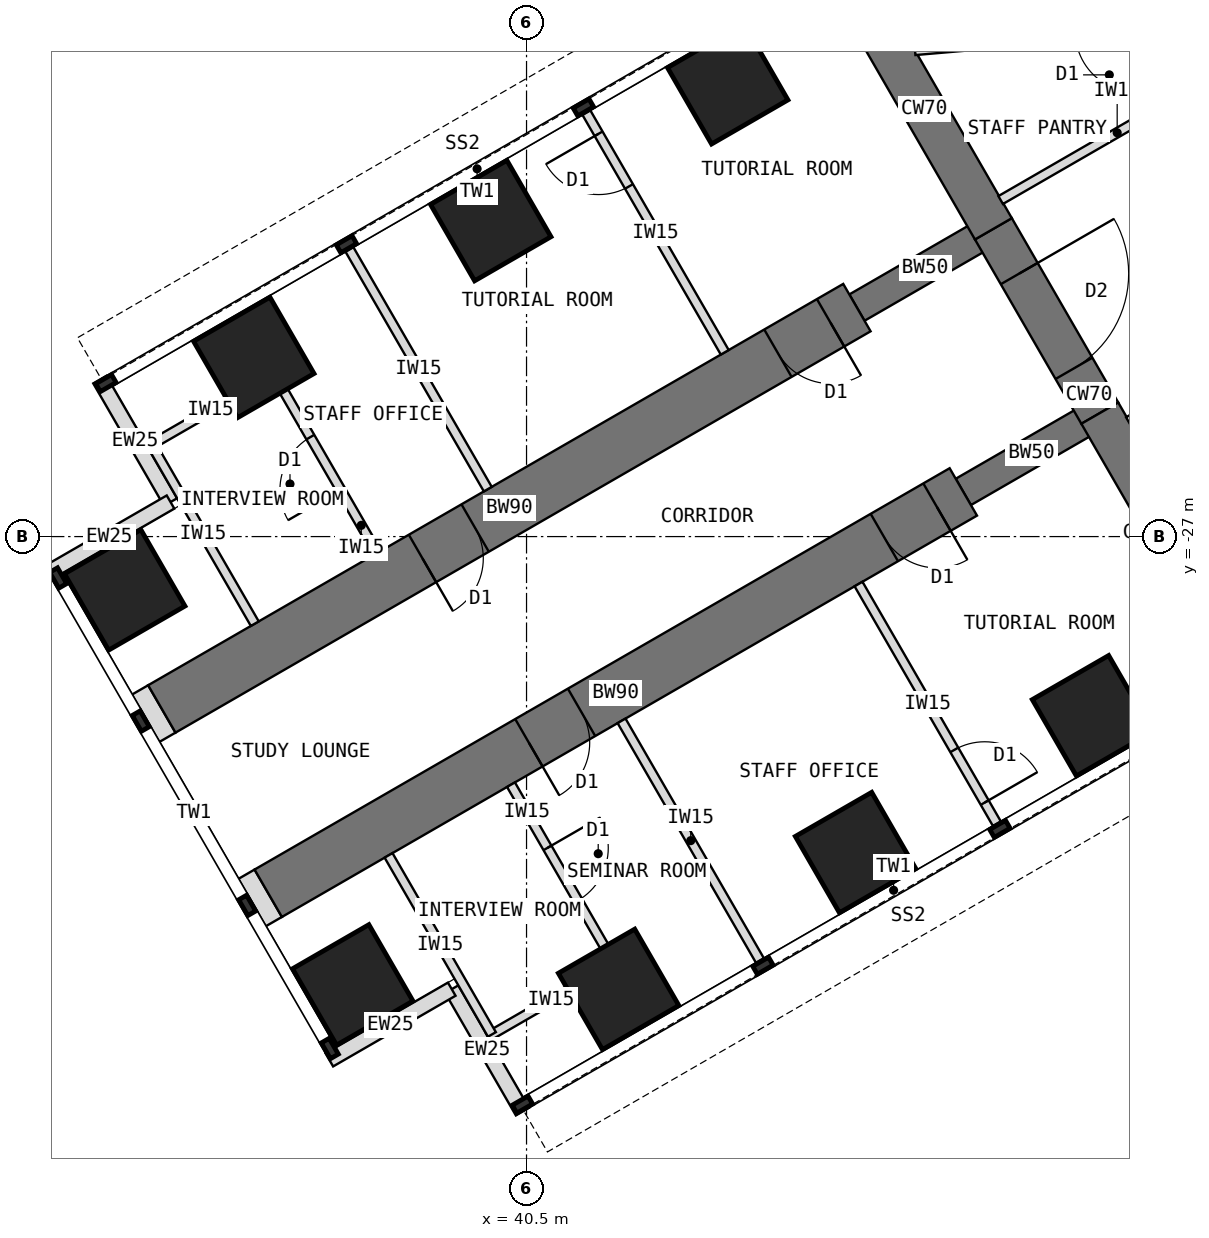
"""IFC4 building model, lengths in metres.
Left out: names, types, materials, properties, quantities, classifications, styles, units other than length and angle.
Written with IfcOpenShell. Run it as: python <this file> out.ifc"""

import sys

from ifc_helpers import new_model, si_unit, direction, frame, frame_2d, origin, origin_2d, place, context, subcontext, project, spatial, rectangle, extrude, element, fill, save


model = new_model("IFC4")
c1 = context("Model", 3, precision=1e-05, world=origin(), true_north=direction((0.0, 1.0)))
c2 = subcontext(c1, "Body", "Model", "MODEL_VIEW")
j1 = project(units=[si_unit("LENGTHUNIT", "METRE"), si_unit("PLANEANGLEUNIT", "RADIAN")], contexts=[c1])
p1 = place(None, origin())
s1 = spatial("IfcSite", under=j1, at=p1, CompositionType="ELEMENT")
p2 = place(p1, origin())
s2 = spatial("IfcBuilding", under=s1, at=p2, CompositionType="ELEMENT")
p3 = place(p2, frame((0.0, 0.0, 64.5)))
s3 = spatial("IfcBuildingStorey", under=s2, at=p3, CompositionType="ELEMENT", Elevation=64.5)
p4 = place(p3, frame((45.904, -18.0, 0.0), z_axis=(0.0, 0.0, 1.0), x_axis=(0.500024481964, -0.866011268655, 0.0)))
e1 = element("IfcWall", 1, at=p4, inside=s3, PredefinedType="SHEAR", context=c2, shape_type="SweptSolid", body=[
    extrude(rectangle(XDim=4.548, YDim=0.7, at=frame_2d((2.274, 0.0))), origin(), (0.0, 0.0, 1.0), 4.0),
])
p5 = place(p3, frame((48.178, -21.939, 0.0), z_axis=(0.0, 0.0, 1.0), x_axis=(0.500010275428, -0.866019471182, 0.0)))
e2 = element("IfcWall", 2, at=p5, inside=s3, PredefinedType="SHEAR", context=c2, shape_type="SweptSolid", body=[
    extrude(rectangle(XDim=3.5, YDim=0.7, at=frame_2d((1.75, 0.0))), origin(), (0.0, 0.0, 1.0), 4.0),
])
p6 = place(p5, frame((0.85, 0.0, 0.0)))
e3 = element("IfcOpeningElement", 3, at=p6, cuts=e2, PredefinedType="OPENING", context=c2, shape_type="SweptSolid", body=[
    extrude(rectangle(XDim=1.8, YDim=2.1, at=frame_2d((0.9, 1.05))), frame((0.0, 0.36, 0.0), z_axis=(0.0, -1.0, 0.0), x_axis=(1.0, 0.0, 0.0)), (0.0, 0.0, 1.0), 0.72),
])
p7 = place(p3, frame((49.928, -24.97, 0.0), z_axis=(0.0, 0.0, 1.0), x_axis=(0.499984222037, -0.866034513004, 0.0)))
e4 = element("IfcWall", 4, at=p7, inside=s3, PredefinedType="SHEAR", context=c2, shape_type="SweptSolid", body=[
    extrude(rectangle(XDim=4.548, YDim=0.7, at=frame_2d((2.274, 0.0))), origin(), (0.0, 0.0, 1.0), 4.0),
])
p8 = place(p3, frame((49.928, -24.97, 0.0), z_axis=(0.0, 0.0, 1.0), x_axis=(-0.866031863473, -0.499988811324, 0.0)))
e5 = element("IfcWall", 5, at=p8, inside=s3, PredefinedType="SHEAR", context=c2, shape_type="SweptSolid", body=[
    extrude(rectangle(XDim=2.592, YDim=0.5, at=frame_2d((1.296, 0.0))), origin(), (0.0, 0.0, 1.0), 4.0),
])
p9 = place(p3, frame((47.684, -26.266, 0.0), z_axis=(0.0, 0.0, 1.0), x_axis=(-0.866027579429, -0.499996231654, 0.0)))
e6 = element("IfcWall", 6, at=p9, inside=s3, PredefinedType="SHEAR", context=c2, shape_type="SweptSolid", body=[
    extrude(rectangle(XDim=13.2, YDim=0.9, at=frame_2d((6.6, 0.0))), origin(), (0.0, 0.0, 1.0), 4.0),
])
p10 = place(p9, frame((0.5, 0.0, 0.0)))
e7 = element("IfcOpeningElement", 7, at=p10, cuts=e6, PredefinedType="OPENING", context=c2, shape_type="SweptSolid", body=[
    extrude(rectangle(XDim=1.0, YDim=2.1, at=frame_2d((0.5, 1.05))), frame((0.0, 0.46, 0.0), z_axis=(0.0, -1.0, 0.0), x_axis=(1.0, 0.0, 0.0)), (0.0, 0.0, 1.0), 0.92),
])
p11 = place(p9, frame((7.25, 0.0, 0.0)))
e8 = element("IfcOpeningElement", 8, at=p11, cuts=e6, PredefinedType="OPENING", context=c2, shape_type="SweptSolid", body=[
    extrude(rectangle(XDim=1.0, YDim=2.1, at=frame_2d((0.5, 1.05))), frame((0.0, 0.46, 0.0), z_axis=(0.0, -1.0, 0.0), x_axis=(1.0, 0.0, 0.0)), (0.0, 0.0, 1.0), 0.92),
])
p12 = place(p3, frame((48.178, -21.939, 0.0), z_axis=(0.0, 0.0, 1.0), x_axis=(-0.866072649678, -0.499918158782, 0.0)))
e9 = element("IfcWall", 9, at=p12, inside=s3, PredefinedType="SHEAR", context=c2, shape_type="SweptSolid", body=[
    extrude(rectangle(XDim=2.592, YDim=0.5, at=frame_2d((1.296, 0.0))), origin(), (0.0, 0.0, 1.0), 4.0),
])
p13 = place(p3, frame((45.934, -23.234, 0.0), z_axis=(0.0, 0.0, 1.0), x_axis=(-0.866019570528, -0.500010103361, 0.0)))
e10 = element("IfcWall", 10, at=p13, inside=s3, PredefinedType="SHEAR", context=c2, shape_type="SweptSolid", body=[
    extrude(rectangle(XDim=13.2, YDim=0.9, at=frame_2d((6.6, 0.0))), origin(), (0.0, 0.0, 1.0), 4.0),
])
p14 = place(p13, frame((0.5, 0.0, 0.0)))
e11 = element("IfcOpeningElement", 11, at=p14, cuts=e10, PredefinedType="OPENING", context=c2, shape_type="SweptSolid", body=[
    extrude(rectangle(XDim=1.0, YDim=2.1, at=frame_2d((0.5, 1.05))), frame((0.0, 0.46, 0.0), z_axis=(0.0, -1.0, 0.0), x_axis=(1.0, 0.0, 0.0)), (0.0, 0.0, 1.0), 0.92),
])
p15 = place(p13, frame((7.25, 0.0, 0.0)))
e12 = element("IfcOpeningElement", 12, at=p15, cuts=e10, PredefinedType="OPENING", context=c2, shape_type="SweptSolid", body=[
    extrude(rectangle(XDim=1.0, YDim=2.1, at=frame_2d((0.5, 1.05))), frame((0.0, 0.46, 0.0), z_axis=(0.0, -1.0, 0.0), x_axis=(1.0, 0.0, 0.0)), (0.0, 0.0, 1.0), 0.92),
])
for number, where, z_axis, x_axis in (
    (13, (49.809, -29.946, 0.0), (0.0, 0.0, 1.0), (0.866, 0.5, 0.0)),
    (14, (43.809, -19.554, 0.0), (0.0, 0.0, 1.0), (0.866, 0.5, 0.0)),
    (15, (45.912, -32.196, 0.0), (0.0, 0.0, 1.0), (0.866, 0.5, 0.0)),
    (16, (39.912, -21.804, 0.0), (0.0, 0.0, 1.0), (0.866, 0.5, 0.0)),
    (17, (42.014, -34.446, 0.0), (0.0, 0.0, 1.0), (0.866, 0.5, 0.0)),
    (18, (36.014, -24.054, 0.0), (0.0, 0.0, 1.0), (0.866, 0.5, 0.0)),
    (19, (37.642, -34.373, 0.0), (0.0, 0.0, 1.0), (0.866, 0.5, 0.0)),
    (20, (33.892, -27.877, 0.0), (0.0, 0.0, 1.0), (0.866, 0.5, 0.0)),
):
    element("IfcColumn", number, at=place(p3, frame(where, z_axis=z_axis, x_axis=x_axis)), inside=s3, PredefinedType="COLUMN", context=c2, shape_type="SweptSolid", body=[
        extrude(rectangle(XDim=1.45, YDim=1.45, at=origin_2d()), origin(), (0.0, 0.0, 1.0), 4.0),
    ])
for number, where, z_axis, x_axis in (
    (21, (40.433, -36.456, 0.0), (0.0, 0.0, 1.0), (-0.5, 0.866, 0.0)),
    (22, (39.27, -34.443, 0.0), (0.0, 0.0, 1.0), (-0.866, -0.5, 0.0)),
    (23, (33.483, -24.419, 0.0), (0.0, 0.0, 1.0), (0.5, -0.866, 0.0)),
    (24, (34.645, -26.432, 0.0), (0.0, 0.0, 1.0), (-0.866, -0.5, 0.0)),
):
    element("IfcWall", number, at=place(p3, frame(where, z_axis=z_axis, x_axis=x_axis)), inside=s3, PredefinedType="STANDARD", context=c2, shape_type="SweptSolid", body=[
        extrude(rectangle(XDim=2.325, YDim=0.25, at=frame_2d((1.163, 0.0))), origin(), (0.0, 0.0, 1.0), 3.8),
    ])
for number, where, z_axis, x_axis in (
    (25, (36.252, -32.865, 0.0), (0.0, 0.0, 1.0), (-0.866, -0.5, 0.0)),
    (26, (34.502, -29.834, 0.0), (0.0, 0.0, 1.0), (-0.866, -0.5, 0.0)),
):
    element("IfcWall", number, at=place(p3, frame(where, z_axis=z_axis, x_axis=x_axis)), inside=s3, PredefinedType="PARTITIONING", context=c2, shape_type="SweptSolid", body=[
        extrude(rectangle(XDim=0.31, YDim=0.9, at=frame_2d((0.155, 0.0))), origin(), (0.0, 0.0, 1.0), 3.8),
    ])
p16 = place(p3, frame((52.38, -19.201, 0.0), z_axis=(0.0, 0.0, 1.0), x_axis=(-0.866023886965, 0.500002627198, 0.0)))
e27 = element("IfcWall", 27, at=p16, inside=s3, PredefinedType="SHEAR", context=c2, shape_type="SweptSolid", body=[
    extrude(rectangle(XDim=5.858, YDim=0.4, at=frame_2d((2.929, 0.0))), origin(), (0.0, 0.0, 1.0), 4.0),
])
p17 = place(p3, frame((45.96, -27.78, 0.0), z_axis=(0.0, 0.0, 1.0), x_axis=(0.499982560684, -0.866035472144, 0.0)))
e28 = element("IfcWall", 28, at=p17, inside=s3, PredefinedType="PARTITIONING", context=c2, shape_type="SweptSolid", body=[
    extrude(rectangle(XDim=4.55, YDim=0.15, at=frame_2d((2.275, 0.0))), origin(), (0.0, 0.0, 1.0), 3.8),
])
p18 = place(p17, frame((3.15, 0.0, 0.0)))
e29 = element("IfcOpeningElement", 29, at=p18, cuts=e28, PredefinedType="OPENING", context=c2, shape_type="SweptSolid", body=[
    extrude(rectangle(XDim=1.0, YDim=2.1, at=frame_2d((0.5, 1.05))), frame((0.0, 0.085, 0.0), z_axis=(0.0, -1.0, 0.0), x_axis=(1.0, 0.0, 0.0)), (0.0, 0.0, 1.0), 0.17),
])
p19 = place(p3, frame((42.063, -30.03, 0.0), z_axis=(0.0, 0.0, 1.0), x_axis=(0.499982560684, -0.866035472144, 0.0)))
e30 = element("IfcWall", 30, at=p19, inside=s3, PredefinedType="PARTITIONING", context=c2, shape_type="SweptSolid", body=[
    extrude(rectangle(XDim=4.55, YDim=0.15, at=frame_2d((2.275, 0.0))), origin(), (0.0, 0.0, 1.0), 3.8),
])
p20 = place(p3, frame((41.944, -34.025, 0.0), z_axis=(0.0, 0.0, 1.0), x_axis=(-0.865980596518, -0.500077600433, 0.0)))
e31 = element("IfcWall", 31, at=p20, inside=s3, PredefinedType="PARTITIONING", context=c2, shape_type="SweptSolid", body=[
    extrude(rectangle(XDim=2.4, YDim=0.15, at=frame_2d((1.2, 0.0))), origin(), (0.0, 0.0, 1.0), 3.8),
])
p21 = place(p3, frame((40.244, -31.08, 0.0), z_axis=(0.0, 0.0, 1.0), x_axis=(0.500008388397, -0.866020560687, 0.0)))
e32 = element("IfcWall", 32, at=p21, inside=s3, PredefinedType="PARTITIONING", context=c2, shape_type="SweptSolid", body=[
    extrude(rectangle(XDim=3.4, YDim=0.15, at=frame_2d((1.7, 0.0))), origin(), (0.0, 0.0, 1.0), 3.8),
])
p22 = place(p21, frame((1.2, 0.0, 0.0)))
e33 = element("IfcOpeningElement", 33, at=p22, cuts=e32, PredefinedType="OPENING", context=c2, shape_type="SweptSolid", body=[
    extrude(rectangle(XDim=1.0, YDim=2.1, at=frame_2d((0.5, 1.05))), frame((0.0, 0.085, 0.0), z_axis=(0.0, -1.0, 0.0), x_axis=(1.0, 0.0, 0.0)), (0.0, 0.0, 1.0), 0.17),
])
p23 = place(p3, frame((38.231, -32.243, 0.0), z_axis=(0.0, 0.0, 1.0), x_axis=(0.500031147688, -0.866007419912, 0.0)))
e34 = element("IfcWall", 34, at=p23, inside=s3, PredefinedType="PARTITIONING", context=c2, shape_type="SweptSolid", body=[
    extrude(rectangle(XDim=3.4, YDim=0.15, at=frame_2d((1.7, 0.0))), origin(), (0.0, 0.0, 1.0), 3.8),
])
p24 = place(p3, frame((43.76, -23.97, 0.0), z_axis=(0.0, 0.0, 1.0), x_axis=(-0.499982560684, 0.866035472144, 0.0)))
e35 = element("IfcWall", 35, at=p24, inside=s3, PredefinedType="PARTITIONING", context=c2, shape_type="SweptSolid", body=[
    extrude(rectangle(XDim=4.55, YDim=0.15, at=frame_2d((2.275, 0.0))), origin(), (0.0, 0.0, 1.0), 3.8),
])
p25 = place(p24, frame((3.15, 0.0, 0.0)))
e36 = element("IfcOpeningElement", 36, at=p25, cuts=e35, PredefinedType="OPENING", context=c2, shape_type="SweptSolid", body=[
    extrude(rectangle(XDim=1.0, YDim=2.1, at=frame_2d((0.5, 1.05))), frame((0.0, 0.085, 0.0), z_axis=(0.0, -1.0, 0.0), x_axis=(1.0, 0.0, 0.0)), (0.0, 0.0, 1.0), 0.17),
])
p26 = place(p3, frame((39.863, -26.22, 0.0), z_axis=(0.0, 0.0, 1.0), x_axis=(-0.500022803284, 0.866012237902, 0.0)))
e37 = element("IfcWall", 37, at=p26, inside=s3, PredefinedType="PARTITIONING", context=c2, shape_type="SweptSolid", body=[
    extrude(rectangle(XDim=4.55, YDim=0.15, at=frame_2d((2.275, 0.0))), origin(), (0.0, 0.0, 1.0), 3.8),
])
p27 = place(p3, frame((36.344, -24.325, 0.0), z_axis=(0.0, 0.0, 1.0), x_axis=(-0.866024647952, -0.500001309137, 0.0)))
e38 = element("IfcWall", 38, at=p27, inside=s3, PredefinedType="PARTITIONING", context=c2, shape_type="SweptSolid", body=[
    extrude(rectangle(XDim=2.4, YDim=0.15, at=frame_2d((1.2, 0.0))), origin(), (0.0, 0.0, 1.0), 3.8),
])
p28 = place(p3, frame((38.044, -27.27, 0.0), z_axis=(0.0, 0.0, 1.0), x_axis=(-0.500031147688, 0.866007419912, 0.0)))
e39 = element("IfcWall", 39, at=p28, inside=s3, PredefinedType="PARTITIONING", context=c2, shape_type="SweptSolid", body=[
    extrude(rectangle(XDim=3.4, YDim=0.15, at=frame_2d((1.7, 0.0))), origin(), (0.0, 0.0, 1.0), 3.8),
])
p29 = place(p28, frame((1.2, 0.0, 0.0)))
e40 = element("IfcOpeningElement", 40, at=p29, cuts=e39, PredefinedType="OPENING", context=c2, shape_type="SweptSolid", body=[
    extrude(rectangle(XDim=1.0, YDim=2.1, at=frame_2d((0.5, 1.05))), frame((0.0, 0.085, 0.0), z_axis=(0.0, -1.0, 0.0), x_axis=(1.0, 0.0, 0.0)), (0.0, 0.0, 1.0), 0.17),
])
p30 = place(p3, frame((36.031, -28.432, 0.0), z_axis=(0.0, 0.0, 1.0), x_axis=(-0.500008388397, 0.866020560687, 0.0)))
e41 = element("IfcWall", 41, at=p30, inside=s3, PredefinedType="PARTITIONING", context=c2, shape_type="SweptSolid", body=[
    extrude(rectangle(XDim=3.4, YDim=0.15, at=frame_2d((1.7, 0.0))), origin(), (0.0, 0.0, 1.0), 3.8),
])
p31 = place(p3, frame((48.298, -21.466, 0.0), z_axis=(0.0, 0.0, 1.0), x_axis=(0.866021148949, 0.500007369519, 0.0)))
e42 = element("IfcWall", 42, at=p31, inside=s3, PredefinedType="PARTITIONING", context=c2, shape_type="SweptSolid", body=[
    extrude(rectangle(XDim=4.426, YDim=0.15, at=frame_2d((2.213, 0.0))), origin(), (0.0, 0.0, 1.0), 3.8),
])
p32 = place(p31, frame((2.598, 0.0, 0.0)))
e43 = element("IfcOpeningElement", 43, at=p32, cuts=e42, PredefinedType="OPENING", context=c2, shape_type="SweptSolid", body=[
    extrude(rectangle(XDim=1.0, YDim=2.1, at=frame_2d((0.5, 1.05))), frame((0.0, 0.085, 0.0), z_axis=(0.0, -1.0, 0.0), x_axis=(1.0, 0.0, 0.0)), (0.0, 0.0, 1.0), 0.17),
])
p33 = place(p3, frame((54.23, -22.89, 0.0), z_axis=(0.0, 0.0, 1.0), x_axis=(-0.866021148949, -0.500007369519, 0.0)))
e44 = element("IfcWall", 44, at=p33, inside=s3, PredefinedType="PARTITIONING", context=c2, shape_type="SweptSolid", body=[
    extrude(rectangle(XDim=4.426, YDim=0.15, at=frame_2d((2.213, 0.0))), origin(), (0.0, 0.0, 1.0), 3.8),
])
p34 = place(p33, frame((0.828, 0.0, 0.0)))
e45 = element("IfcOpeningElement", 45, at=p34, cuts=e44, PredefinedType="OPENING", context=c2, shape_type="SweptSolid", body=[
    extrude(rectangle(XDim=1.0, YDim=2.1, at=frame_2d((0.5, 1.05))), frame((0.0, 0.085, 0.0), z_axis=(0.0, -1.0, 0.0), x_axis=(1.0, 0.0, 0.0)), (0.0, 0.0, 1.0), 0.17),
])
p35 = place(p3, frame((51.371, -18.618, 0.0), z_axis=(0.0, 0.0, 1.0), x_axis=(-0.996259708579, -0.086409450071, 0.0)))
e46 = element("IfcWall", 46, at=p35, inside=s3, PredefinedType="PARTITIONING", context=c2, shape_type="SweptSolid", body=[
    extrude(rectangle(XDim=4.498, YDim=0.15, at=frame_2d((2.249, 0.0))), origin(), (0.0, 0.0, 1.0), 3.8),
])
p36 = place(p35, frame((0.849, 0.0, 0.0)))
e47 = element("IfcOpeningElement", 47, at=p36, cuts=e46, PredefinedType="OPENING", context=c2, shape_type="SweptSolid", body=[
    extrude(rectangle(XDim=1.0, YDim=2.1, at=frame_2d((0.5, 1.05))), frame((0.0, 0.085, 0.0), z_axis=(0.0, -1.0, 0.0), x_axis=(1.0, 0.0, 0.0)), (0.0, 0.0, 1.0), 0.17),
])
p37 = place(p6, origin())
e48 = element("IfcDoor", 48, at=p37, inside=s3, OperationType="DOUBLE_DOOR_DOUBLE_SWING", PredefinedType="DOOR", context=c2, shape_type="SweptSolid", body=[
    extrude(rectangle(XDim=1.72, YDim=2.06, at=frame_2d((0.9, 1.03))), frame((0.0, 0.025, 0.0), z_axis=(0.0, -1.0, 0.0), x_axis=(1.0, 0.0, 0.0)), (0.0, 0.0, 1.0), 0.05),
    extrude(rectangle(XDim=0.04, YDim=2.1, at=frame_2d((0.02, 1.05))), frame((0.0, 0.35, 0.0), z_axis=(0.0, -1.0, 0.0), x_axis=(1.0, 0.0, 0.0)), (0.0, 0.0, 1.0), 0.699),
    extrude(rectangle(XDim=0.04, YDim=2.1, at=frame_2d((1.78, 1.05))), frame((0.0, 0.35, 0.0), z_axis=(0.0, -1.0, 0.0), x_axis=(1.0, 0.0, 0.0)), (0.0, 0.0, 1.0), 0.699),
    extrude(rectangle(XDim=1.72, YDim=0.04, at=frame_2d((0.9, 2.08))), frame((0.0, 0.35, 0.0), z_axis=(0.0, -1.0, 0.0), x_axis=(1.0, 0.0, 0.0)), (0.0, 0.0, 1.0), 0.699),
])
fill(e3, e48)
p38 = place(p18, origin())
e49 = element("IfcDoor", 49, at=p38, inside=s3, OperationType="SINGLE_SWING_RIGHT", PredefinedType="DOOR", context=c2, shape_type="SweptSolid", body=[
    extrude(rectangle(XDim=1.0, YDim=2.1, at=frame_2d((0.5, 1.05))), frame((0.0, 0.025, 0.0), z_axis=(0.0, -1.0, 0.0), x_axis=(1.0, 0.0, 0.0)), (0.0, 0.0, 1.0), 0.05),
])
fill(e29, e49)
p39 = place(p22, origin())
e50 = element("IfcDoor", 50, at=p39, inside=s3, OperationType="SINGLE_SWING_LEFT", PredefinedType="DOOR", context=c2, shape_type="SweptSolid", body=[
    extrude(rectangle(XDim=1.0, YDim=2.1, at=frame_2d((0.5, 1.05))), frame((0.0, 0.025, 0.0), z_axis=(0.0, -1.0, 0.0), x_axis=(1.0, 0.0, 0.0)), (0.0, 0.0, 1.0), 0.05),
])
fill(e33, e50)
p40 = place(p25, origin())
e51 = element("IfcDoor", 51, at=p40, inside=s3, OperationType="SINGLE_SWING_RIGHT", PredefinedType="DOOR", context=c2, shape_type="SweptSolid", body=[
    extrude(rectangle(XDim=1.0, YDim=2.1, at=frame_2d((0.5, 1.05))), frame((0.0, 0.025, 0.0), z_axis=(0.0, -1.0, 0.0), x_axis=(1.0, 0.0, 0.0)), (0.0, 0.0, 1.0), 0.05),
])
fill(e36, e51)
p41 = place(p29, origin())
e52 = element("IfcDoor", 52, at=p41, inside=s3, OperationType="SINGLE_SWING_LEFT", PredefinedType="DOOR", context=c2, shape_type="SweptSolid", body=[
    extrude(rectangle(XDim=1.0, YDim=2.1, at=frame_2d((0.5, 1.05))), frame((0.0, 0.025, 0.0), z_axis=(0.0, -1.0, 0.0), x_axis=(1.0, 0.0, 0.0)), (0.0, 0.0, 1.0), 0.05),
])
fill(e40, e52)
p42 = place(p10, origin())
e53 = element("IfcDoor", 53, at=p42, inside=s3, OperationType="SINGLE_SWING_LEFT", PredefinedType="DOOR", context=c2, shape_type="SweptSolid", body=[
    extrude(rectangle(XDim=0.92, YDim=2.06, at=frame_2d((0.5, 1.03))), frame((0.0, 0.025, 0.0), z_axis=(0.0, -1.0, 0.0), x_axis=(1.0, 0.0, 0.0)), (0.0, 0.0, 1.0), 0.05),
    extrude(rectangle(XDim=0.04, YDim=2.1, at=frame_2d((0.02, 1.05))), frame((0.0, 0.45, 0.0), z_axis=(0.0, -1.0, 0.0), x_axis=(1.0, 0.0, 0.0)), (0.0, 0.0, 1.0), 0.899),
    extrude(rectangle(XDim=0.04, YDim=2.1, at=frame_2d((0.98, 1.05))), frame((0.0, 0.45, 0.0), z_axis=(0.0, -1.0, 0.0), x_axis=(1.0, 0.0, 0.0)), (0.0, 0.0, 1.0), 0.899),
    extrude(rectangle(XDim=0.92, YDim=0.04, at=frame_2d((0.5, 2.08))), frame((0.0, 0.45, 0.0), z_axis=(0.0, -1.0, 0.0), x_axis=(1.0, 0.0, 0.0)), (0.0, 0.0, 1.0), 0.899),
])
fill(e7, e53)
p43 = place(p11, origin())
e54 = element("IfcDoor", 54, at=p43, inside=s3, OperationType="SINGLE_SWING_RIGHT", PredefinedType="DOOR", context=c2, shape_type="SweptSolid", body=[
    extrude(rectangle(XDim=0.92, YDim=2.06, at=frame_2d((0.5, 1.03))), frame((0.0, 0.025, 0.0), z_axis=(0.0, -1.0, 0.0), x_axis=(1.0, 0.0, 0.0)), (0.0, 0.0, 1.0), 0.05),
    extrude(rectangle(XDim=0.04, YDim=2.1, at=frame_2d((0.02, 1.05))), frame((0.0, 0.45, 0.0), z_axis=(0.0, -1.0, 0.0), x_axis=(1.0, 0.0, 0.0)), (0.0, 0.0, 1.0), 0.899),
    extrude(rectangle(XDim=0.04, YDim=2.1, at=frame_2d((0.98, 1.05))), frame((0.0, 0.45, 0.0), z_axis=(0.0, -1.0, 0.0), x_axis=(1.0, 0.0, 0.0)), (0.0, 0.0, 1.0), 0.899),
    extrude(rectangle(XDim=0.92, YDim=0.04, at=frame_2d((0.5, 2.08))), frame((0.0, 0.45, 0.0), z_axis=(0.0, -1.0, 0.0), x_axis=(1.0, 0.0, 0.0)), (0.0, 0.0, 1.0), 0.899),
])
fill(e8, e54)
p44 = place(p14, origin())
e55 = element("IfcDoor", 55, at=p44, inside=s3, OperationType="SINGLE_SWING_LEFT", PredefinedType="DOOR", context=c2, shape_type="SweptSolid", body=[
    extrude(rectangle(XDim=0.92, YDim=2.06, at=frame_2d((0.5, 1.03))), frame((0.0, 0.025, 0.0), z_axis=(0.0, -1.0, 0.0), x_axis=(1.0, 0.0, 0.0)), (0.0, 0.0, 1.0), 0.05),
    extrude(rectangle(XDim=0.04, YDim=2.1, at=frame_2d((0.02, 1.05))), frame((0.0, 0.45, 0.0), z_axis=(0.0, -1.0, 0.0), x_axis=(1.0, 0.0, 0.0)), (0.0, 0.0, 1.0), 0.899),
    extrude(rectangle(XDim=0.04, YDim=2.1, at=frame_2d((0.98, 1.05))), frame((0.0, 0.45, 0.0), z_axis=(0.0, -1.0, 0.0), x_axis=(1.0, 0.0, 0.0)), (0.0, 0.0, 1.0), 0.899),
    extrude(rectangle(XDim=0.92, YDim=0.04, at=frame_2d((0.5, 2.08))), frame((0.0, 0.45, 0.0), z_axis=(0.0, -1.0, 0.0), x_axis=(1.0, 0.0, 0.0)), (0.0, 0.0, 1.0), 0.899),
])
fill(e11, e55)
p45 = place(p15, origin())
e56 = element("IfcDoor", 56, at=p45, inside=s3, OperationType="SINGLE_SWING_RIGHT", PredefinedType="DOOR", context=c2, shape_type="SweptSolid", body=[
    extrude(rectangle(XDim=0.92, YDim=2.06, at=frame_2d((0.5, 1.03))), frame((0.0, 0.025, 0.0), z_axis=(0.0, -1.0, 0.0), x_axis=(1.0, 0.0, 0.0)), (0.0, 0.0, 1.0), 0.05),
    extrude(rectangle(XDim=0.04, YDim=2.1, at=frame_2d((0.02, 1.05))), frame((0.0, 0.45, 0.0), z_axis=(0.0, -1.0, 0.0), x_axis=(1.0, 0.0, 0.0)), (0.0, 0.0, 1.0), 0.899),
    extrude(rectangle(XDim=0.04, YDim=2.1, at=frame_2d((0.98, 1.05))), frame((0.0, 0.45, 0.0), z_axis=(0.0, -1.0, 0.0), x_axis=(1.0, 0.0, 0.0)), (0.0, 0.0, 1.0), 0.899),
    extrude(rectangle(XDim=0.92, YDim=0.04, at=frame_2d((0.5, 2.08))), frame((0.0, 0.45, 0.0), z_axis=(0.0, -1.0, 0.0), x_axis=(1.0, 0.0, 0.0)), (0.0, 0.0, 1.0), 0.899),
])
fill(e12, e56)
save(model, sys.argv[1])
